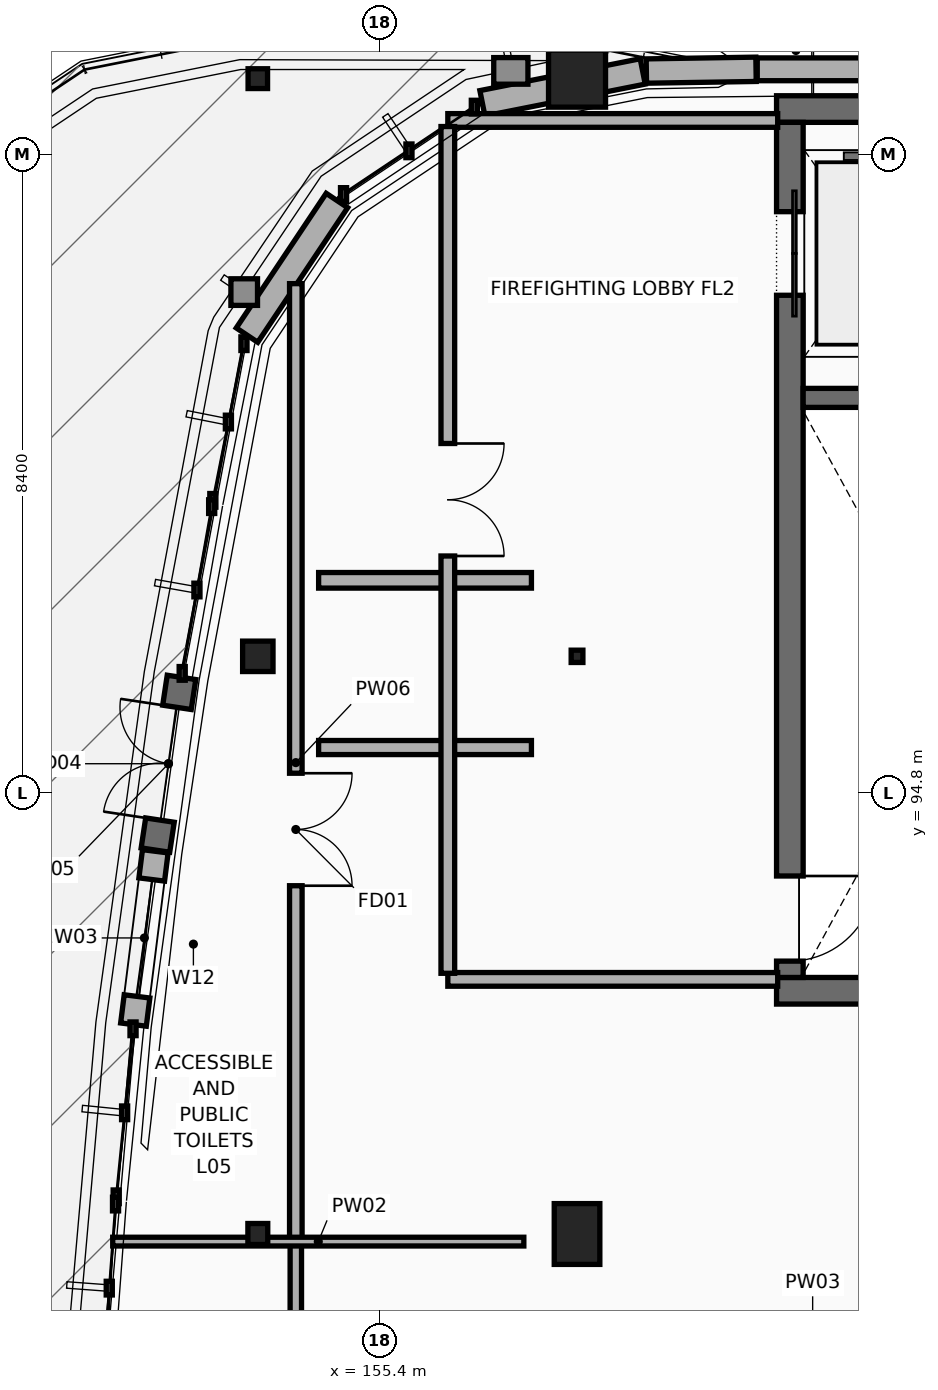
"""IFC4 building model, lengths in metres.
Left out: names, types, materials, properties, quantities, classifications, styles, units other than length and angle.
Written with IfcOpenShell. Run it as: python <this file> out.ifc"""

import sys

from ifc_helpers import new_model, si_unit, direction, frame, frame_2d, origin, origin_2d, place, context, subcontext, project, spatial, rectangle, i_section, extrude, element, fill, save


model = new_model("IFC4")
c1 = context("Model", 3, precision=1e-05, world=origin(), true_north=direction((0.0, 1.0)))
c2 = subcontext(c1, "Body", "Model", "MODEL_VIEW")
j1 = project(units=[si_unit("LENGTHUNIT", "METRE"), si_unit("PLANEANGLEUNIT", "RADIAN")], contexts=[c1])
p1 = place(None, origin())
s1 = spatial("IfcSite", under=j1, at=p1, CompositionType="ELEMENT")
p2 = place(p1, origin())
s2 = spatial("IfcBuilding", under=s1, at=p2, CompositionType="ELEMENT")
p3 = place(p2, frame((0.0, 0.0, 19.8)))
s3 = spatial("IfcBuildingStorey", under=s2, at=p3, CompositionType="ELEMENT", Elevation=19.8)
for number, where, z_axis, x_axis in (
    (1, (160.625, 92.2, 0.0), (0.0, 0.0, 1.0), (1.0, 0.0, 0.0)),
    (2, (165.375, 103.8, 0.0), (0.0, 0.0, 1.0), (-1.0, 0.0, 0.0)),
):
    element("IfcWall", number, at=place(p3, frame(where, z_axis=z_axis, x_axis=x_axis)), inside=s3, PredefinedType="SHEAR", context=c2, shape_type="SweptSolid", body=[
        extrude(rectangle(XDim=4.75, YDim=0.35, at=frame_2d((2.375, 0.0))), origin(), (0.0, 0.0, 1.0), 3.6),
    ])
p4 = place(p3, frame((160.8, 103.625, 0.0), z_axis=(0.0, 0.0, 1.0), x_axis=(0.0, -1.0, 0.0)))
e3 = element("IfcWall", 3, at=p4, inside=s3, PredefinedType="SHEAR", context=c2, shape_type="SweptSolid", body=[
    extrude(rectangle(XDim=11.25, YDim=0.35, at=frame_2d((5.625, 0.0))), origin(), (0.0, 0.0, 1.0), 3.6),
])
p5 = place(p4, frame((1.175, 0.0, 0.0)))
e4 = element("IfcOpeningElement", 4, at=p5, cuts=e3, PredefinedType="OPENING", context=c2, shape_type="SweptSolid", body=[
    extrude(rectangle(XDim=1.1, YDim=2.2, at=frame_2d((0.55, 1.1))), frame((0.0, 0.185, 0.0), z_axis=(0.0, -1.0, 0.0), x_axis=(1.0, 0.0, 0.0)), (0.0, 0.0, 1.0), 0.37),
])
p6 = place(p4, frame((9.915, 0.0, 0.0)))
e5 = element("IfcOpeningElement", 5, at=p6, cuts=e3, PredefinedType="OPENING", context=c2, shape_type="SweptSolid", body=[
    extrude(rectangle(XDim=1.12, YDim=2.16, at=frame_2d((0.56, 1.08))), frame((0.0, 0.185, 0.0), z_axis=(0.0, -1.0, 0.0), x_axis=(1.0, 0.0, 0.0)), (0.0, 0.0, 1.0), 0.37),
])
p7 = place(p3, frame((160.975, 100.0, 0.0), z_axis=(0.0, 0.0, 1.0), x_axis=(1.0, 0.0, 0.0)))
e6 = element("IfcWall", 6, at=p7, inside=s3, PredefinedType="SHEAR", context=c2, shape_type="SweptSolid", body=[
    extrude(rectangle(XDim=4.05, YDim=0.25, at=frame_2d((2.025, 0.0))), origin(), (0.0, 0.0, 1.0), 3.6),
])
p8 = place(p3, frame((153.8, 89.0, 0.0), z_axis=(0.0, 0.0, 1.0), x_axis=(1.0, 0.0, 0.0)))
e7 = element("IfcColumn", 7, at=p8, inside=s3, PredefinedType="COLUMN", context=c2, shape_type="SweptSolid", body=[
    extrude(i_section(OverallWidth=0.261, OverallDepth=0.276, WebThickness=0.015, FlangeThickness=0.025, at=origin_2d()), origin(), (0.0, 0.0, 1.0), 3.6),
])
p9 = place(p3, frame((153.8, 96.6, 0.0), z_axis=(0.0, 0.0, 1.0), x_axis=(1.0, 0.0, 0.0)))
e8 = element("IfcColumn", 8, at=p9, inside=s3, PredefinedType="COLUMN", context=c2, shape_type="SweptSolid", body=[
    extrude(rectangle(XDim=0.4, YDim=0.4, at=origin_2d()), origin(), (0.0, 0.0, 1.0), 3.6),
])
p10 = place(p3, frame((153.8, 104.2, 0.0), z_axis=(0.0, 0.0, 1.0), x_axis=(1.0, 0.0, 0.0)))
e9 = element("IfcColumn", 9, at=p10, inside=s3, PredefinedType="COLUMN", context=c2, shape_type="SweptSolid", body=[
    extrude(i_section(OverallWidth=0.256, OverallDepth=0.26, WebThickness=0.01, FlangeThickness=0.017, at=origin_2d()), origin(), (0.0, 0.0, 1.0), 3.6),
])
p11 = place(p3, frame((158.0, 89.0, 0.0), z_axis=(0.0, 0.0, 1.0), x_axis=(1.0, 0.0, 0.0)))
e10 = element("IfcColumn", 10, at=p11, inside=s3, PredefinedType="COLUMN", context=c2, shape_type="SweptSolid", body=[
    extrude(rectangle(XDim=0.6, YDim=0.8, at=origin_2d()), origin(), (0.0, 0.0, 1.0), 3.6),
])
p12 = place(p3, frame((158.0, 96.6, 0.0), z_axis=(0.0, 0.0, 1.0), x_axis=(1.0, 0.0, 0.0)))
e11 = element("IfcColumn", 11, at=p12, inside=s3, PredefinedType="COLUMN", context=c2, shape_type="SweptSolid", body=[
    extrude(i_section(OverallWidth=0.154, OverallDepth=0.162, WebThickness=0.008, FlangeThickness=0.011, at=origin_2d()), origin(), (0.0, 0.0, 1.0), 3.6),
])
p13 = place(p3, frame((158.0, 104.2, 0.0), z_axis=(0.0, 0.0, 1.0), x_axis=(1.0, 0.0, 0.0)))
e12 = element("IfcColumn", 12, at=p13, inside=s3, PredefinedType="COLUMN", context=c2, shape_type="SweptSolid", body=[
    extrude(rectangle(XDim=0.75, YDim=0.75, at=origin_2d()), origin(), (0.0, 0.0, 1.0), 3.6),
])
p14 = place(p3, frame((160.371, 104.323, 0.0), z_axis=(0.0, 0.0, 1.0), x_axis=(1.0, 0.0, 0.0)))
e13 = element("IfcWall", 13, at=p14, inside=s3, PredefinedType="STANDARD", context=c2, shape_type="SweptSolid", body=[
    extrude(rectangle(XDim=1.458, YDim=0.3, at=frame_2d((0.729, 0.0))), origin(), (0.0, 0.0, 1.0), 2.95),
])
p15 = place(p3, frame((158.912, 104.3, 0.0), z_axis=(0.0, 0.0, 1.0), x_axis=(0.999873535579, 0.015903233899, 0.0)))
e14 = element("IfcWall", 14, at=p15, inside=s3, PredefinedType="STANDARD", context=c2, shape_type="SweptSolid", body=[
    extrude(rectangle(XDim=1.443, YDim=0.32, at=frame_2d((0.722, 0.0))), origin(), (0.0, 0.0, 1.0), 2.95),
])
p16 = place(p3, frame((156.755, 103.876, 0.0), z_axis=(0.0, 0.0, 1.0), x_axis=(0.980837468909, 0.19482776903, 0.0)))
e15 = element("IfcWall", 15, at=p16, inside=s3, PredefinedType="STANDARD", context=c2, shape_type="SweptSolid", body=[
    extrude(rectangle(XDim=2.15, YDim=0.34, at=frame_2d((1.075, 0.0))), origin(), (0.0, 0.0, 1.0), 2.825),
])
p17 = place(p3, frame((153.658, 100.826, 0.0), z_axis=(0.0, 0.0, 1.0), x_axis=(0.555493531305, 0.831520857633, 0.0)))
e16 = element("IfcWall", 16, at=p17, inside=s3, PredefinedType="STANDARD", context=c2, shape_type="SweptSolid", body=[
    extrude(rectangle(XDim=2.13, YDim=0.34, at=frame_2d((1.065, 0.0))), origin(), (0.0, 0.0, 1.0), 2.692),
])
p18 = place(p3, frame((152.453, 94.051, 0.0), z_axis=(0.0, 0.0, 1.0), x_axis=(0.149286014315, 0.988794056379, 0.0)))
e17 = element("IfcWall", 17, at=p18, inside=s3, PredefinedType="STANDARD", context=c2, shape_type="SweptSolid", body=[
    extrude(rectangle(XDim=2.298, YDim=0.38, at=frame_2d((1.149, 0.0))), origin(), (0.0, 0.0, 1.0), 3.364),
])
p19 = place(p18, frame((0.399, 0.0, 0.0)))
e18 = element("IfcOpeningElement", 18, at=p19, cuts=e17, PredefinedType="OPENING", context=c2, shape_type="SweptSolid", body=[
    extrude(rectangle(XDim=1.5, YDim=2.3, at=frame_2d((0.75, 1.15))), frame((0.0, 0.2, 0.0), z_axis=(0.0, -1.0, 0.0), x_axis=(1.0, 0.0, 0.0)), (0.0, 0.0, 1.0), 0.4),
])
p20 = place(p3, frame((152.164, 91.755, 0.0), z_axis=(0.0, 0.0, 1.0), x_axis=(0.124832313753, 0.992177853735, 0.0)))
e19 = element("IfcWall", 19, at=p20, inside=s3, PredefinedType="STANDARD", context=c2, shape_type="SweptSolid", body=[
    extrude(rectangle(XDim=2.298, YDim=0.34, at=frame_2d((1.149, 0.0))), origin(), (0.0, 0.0, 1.0), 3.364),
])
p21 = place(p20, frame((0.374, 0.0, 0.9)))
e20 = element("IfcOpeningElement", 20, at=p21, cuts=e19, PredefinedType="OPENING", context=c2, shape_type="SweptSolid", body=[
    extrude(rectangle(XDim=1.55, YDim=1.65, at=frame_2d((0.775, 0.825))), frame((0.0, 0.18, 0.0), z_axis=(0.0, -1.0, 0.0), x_axis=(1.0, 0.0, 0.0)), (0.0, 0.0, 1.0), 0.36),
])
p22 = place(p3, frame((154.6, 95.4, 3.6), z_axis=(0.0, 0.0, 1.0), x_axis=(1.0, 0.0, 0.0)))
e21 = element("IfcWall", 21, at=p22, inside=s3, PredefinedType="PARAPET", context=c2, shape_type="SweptSolid", body=[
    extrude(rectangle(XDim=2.8, YDim=0.185, at=frame_2d((1.4, 0.0))), origin(), (0.0, 0.0, 1.0), 0.24),
])
p23 = place(p3, frame((157.4, 97.6, 3.6), z_axis=(0.0, 0.0, 1.0), x_axis=(-1.0, 0.0, 0.0)))
e22 = element("IfcWall", 22, at=p23, inside=s3, PredefinedType="PARAPET", context=c2, shape_type="SweptSolid", body=[
    extrude(rectangle(XDim=2.8, YDim=0.205, at=frame_2d((1.4, 0.0))), origin(), (0.0, 0.0, 1.0), 0.24),
])
p24 = place(p3, frame((156.3, 92.35, 0.0), z_axis=(0.0, 0.0, 1.0), x_axis=(1.0, 0.0, 0.0)))
e23 = element("IfcWall", 23, at=p24, inside=s3, PredefinedType="PARTITIONING", context=c2, shape_type="SweptSolid", body=[
    extrude(rectangle(XDim=4.34, YDim=0.18, at=frame_2d((2.17, 0.0))), origin(), (0.0, 0.0, 1.0), 2.85),
])
p25 = place(p3, frame((160.64, 103.65, 0.0), z_axis=(0.0, 0.0, 1.0), x_axis=(-1.0, 0.0, 0.0)))
e24 = element("IfcWall", 24, at=p25, inside=s3, PredefinedType="PARTITIONING", context=c2, shape_type="SweptSolid", body=[
    extrude(rectangle(XDim=4.34, YDim=0.18, at=frame_2d((2.17, 0.0))), origin(), (0.0, 0.0, 1.0), 2.825),
])
p26 = place(p3, frame((156.3, 103.57, 0.0), z_axis=(0.0, 0.0, 1.0), x_axis=(0.0, -1.0, 0.0)))
e25 = element("IfcWall", 25, at=p26, inside=s3, PredefinedType="PARTITIONING", context=c2, shape_type="SweptSolid", body=[
    extrude(rectangle(XDim=11.14, YDim=0.18, at=frame_2d((5.57, 0.0))), origin(), (0.0, 0.0, 1.0), 2.85),
])
p27 = place(p26, frame((4.17, 0.0, 0.0)))
e26 = element("IfcOpeningElement", 26, at=p27, cuts=e25, PredefinedType="OPENING", context=c2, shape_type="SweptSolid", body=[
    extrude(rectangle(XDim=1.48, YDim=2.22, at=frame_2d((0.74, 1.11))), frame((0.0, 0.1, 0.0), z_axis=(0.0, -1.0, 0.0), x_axis=(1.0, 0.0, 0.0)), (0.0, 0.0, 1.0), 0.2),
])
p28 = place(p3, frame((154.3, 88.9, 0.0), z_axis=(0.0, 0.0, 1.0), x_axis=(0.0, -1.0, 0.0)))
e27 = element("IfcWall", 27, at=p28, inside=s3, PredefinedType="PARTITIONING", context=c2, shape_type="SweptSolid", body=[
    extrude(rectangle(XDim=14.8, YDim=0.15, at=frame_2d((7.4, 0.0))), origin(), (0.0, 0.0, 1.0), 2.538),
])
p29 = place(p28, frame((4.51, 0.0, 0.0)))
e28 = element("IfcOpeningElement", 28, at=p29, cuts=e27, PredefinedType="OPENING", context=c2, shape_type="SweptSolid", body=[
    extrude(rectangle(XDim=1.38, YDim=2.2, at=frame_2d((0.69, 1.1))), frame((0.0, 0.085, 0.0), z_axis=(0.0, -1.0, 0.0), x_axis=(1.0, 0.0, 0.0)), (0.0, 0.0, 1.0), 0.17),
])
p30 = place(p3, frame((154.3, 101.503, 0.0), z_axis=(0.0, 0.0, 1.0), x_axis=(0.0, -1.0, 0.0)))
e29 = element("IfcWall", 29, at=p30, inside=s3, PredefinedType="PARTITIONING", context=c2, shape_type="SweptSolid", body=[
    extrude(rectangle(XDim=12.603, YDim=0.165, at=frame_2d((6.302, 0.0))), origin(), (0.0, 0.0, 1.0), 2.65),
])
p31 = place(p30, frame((6.441, 0.0, 0.0)))
e30 = element("IfcOpeningElement", 30, at=p31, cuts=e29, PredefinedType="OPENING", context=c2, shape_type="SweptSolid", body=[
    extrude(rectangle(XDim=1.48, YDim=2.22, at=frame_2d((0.74, 1.11))), frame((0.0, 0.093, 0.0), z_axis=(0.0, -1.0, 0.0), x_axis=(1.0, 0.0, 0.0)), (0.0, 0.0, 1.0), 0.185),
])
p32 = place(p3, frame((151.891, 88.9, 0.0), z_axis=(0.0, 0.0, 1.0), x_axis=(1.0, 0.0, 0.0)))
e31 = element("IfcWall", 31, at=p32, inside=s3, PredefinedType="PARTITIONING", context=c2, shape_type="SweptSolid", body=[
    extrude(rectangle(XDim=5.409, YDim=0.115, at=frame_2d((2.705, 0.0))), origin(), (0.0, 0.0, 1.0), 2.65),
])
p33 = place(p19, origin())
e32 = element("IfcDoor", 32, at=p33, inside=s3, OperationType="DOUBLE_DOOR_SINGLE_SWING", PredefinedType="DOOR", context=c2, shape_type="SweptSolid", body=[
    extrude(rectangle(XDim=1.5, YDim=2.3, at=frame_2d((0.75, 1.15))), frame((0.0, 0.025, 0.0), z_axis=(0.0, -1.0, 0.0), x_axis=(1.0, 0.0, 0.0)), (0.0, 0.0, 1.0), 0.05),
])
fill(e18, e32)
p34 = place(p21, origin())
e33 = element("IfcWindow", 33, at=p34, inside=s3, PartitioningType="SINGLE_PANEL", PredefinedType="WINDOW", context=c2, shape_type="SweptSolid", body=[
    extrude(rectangle(XDim=1.55, YDim=1.65, at=frame_2d((0.775, 0.825))), frame((0.0, 0.03, 0.0), z_axis=(0.0, -1.0, 0.0), x_axis=(1.0, 0.0, 0.0)), (0.0, 0.0, 1.0), 0.06),
])
fill(e20, e33)
p35 = place(p5, origin())
e34 = element("IfcDoor", 34, at=p35, inside=s3, OperationType="DOUBLE_DOOR_SLIDING", PredefinedType="DOOR", context=c2, shape_type="SweptSolid", body=[
    extrude(rectangle(XDim=1.1, YDim=2.2, at=frame_2d((0.55, 1.1))), frame((0.0, 0.025, 0.0), z_axis=(0.0, -1.0, 0.0), x_axis=(1.0, 0.0, 0.0)), (0.0, 0.0, 1.0), 0.05),
])
fill(e4, e34)
p36 = place(p6, origin())
e35 = element("IfcDoor", 35, at=p36, inside=s3, OperationType="SINGLE_SWING_LEFT", PredefinedType="DOOR", context=c2, shape_type="SweptSolid", body=[
    extrude(rectangle(XDim=1.12, YDim=2.16, at=frame_2d((0.56, 1.08))), frame((0.0, 0.025, 0.0), z_axis=(0.0, -1.0, 0.0), x_axis=(1.0, 0.0, 0.0)), (0.0, 0.0, 1.0), 0.05),
])
fill(e5, e35)
p37 = place(p27, origin())
e36 = element("IfcDoor", 36, at=p37, inside=s3, OperationType="DOUBLE_DOOR_SINGLE_SWING", PredefinedType="DOOR", context=c2, shape_type="SweptSolid", body=[
    extrude(rectangle(XDim=1.48, YDim=2.22, at=frame_2d((0.74, 1.11))), frame((0.0, 0.025, 0.0), z_axis=(0.0, -1.0, 0.0), x_axis=(1.0, 0.0, 0.0)), (0.0, 0.0, 1.0), 0.05),
])
fill(e26, e36)
p38 = place(p31, origin())
e37 = element("IfcDoor", 37, at=p38, inside=s3, OperationType="DOUBLE_DOOR_SINGLE_SWING", PredefinedType="DOOR", context=c2, shape_type="SweptSolid", body=[
    extrude(rectangle(XDim=1.48, YDim=2.22, at=frame_2d((0.74, 1.11))), frame((0.0, 0.025, 0.0), z_axis=(0.0, -1.0, 0.0), x_axis=(1.0, 0.0, 0.0)), (0.0, 0.0, 1.0), 0.05),
])
fill(e30, e37)
save(model, sys.argv[1])
